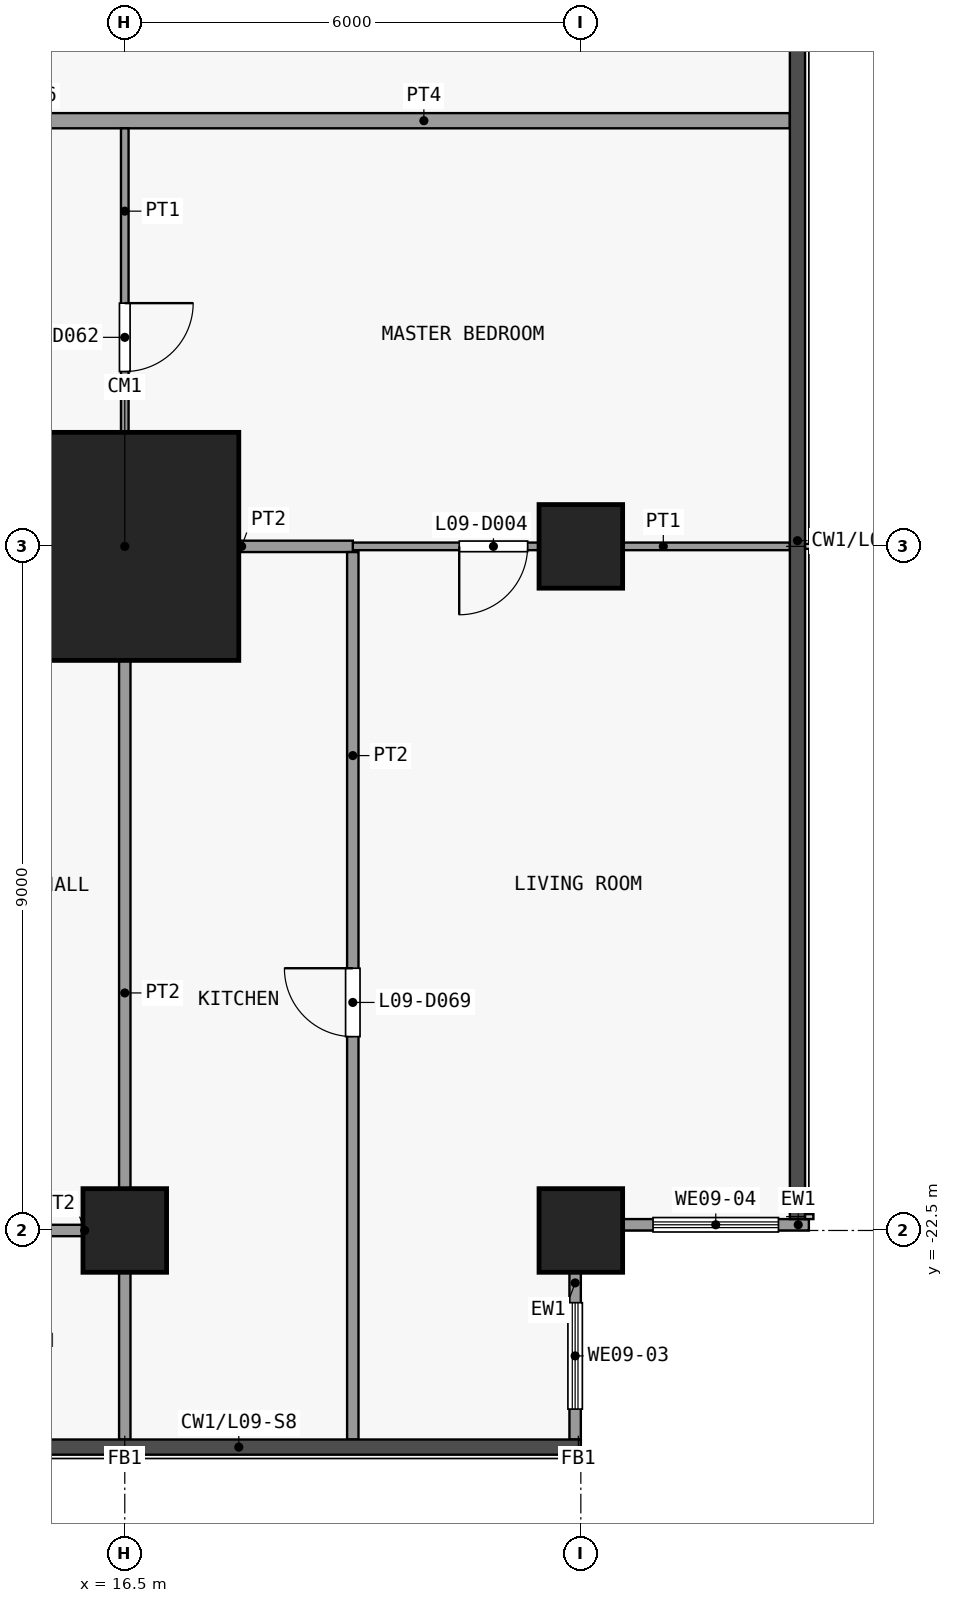
"""IFC4 building model, lengths in metres.
Left out: names, types, materials, properties, quantities, classifications, styles, units other than length and angle.
Written with IfcOpenShell. Run it as: python <this file> out.ifc"""

import sys

from ifc_helpers import new_model, si_unit, direction, frame, frame_2d, origin, origin_2d, place, context, subcontext, project, spatial, rectangle, extrude, element, fill, save


model = new_model("IFC4")
c1 = context("Model", 3, precision=1e-05, world=origin(), true_north=direction((0.0, 1.0)))
c2 = subcontext(c1, "Body", "Model", "MODEL_VIEW")
j1 = project(units=[si_unit("LENGTHUNIT", "METRE"), si_unit("PLANEANGLEUNIT", "RADIAN")], contexts=[c1])
p1 = place(None, origin())
s1 = spatial("IfcSite", under=j1, at=p1, CompositionType="ELEMENT")
p2 = place(p1, origin())
s2 = spatial("IfcBuilding", under=s1, at=p2, CompositionType="ELEMENT")
p3 = place(p2, frame((0.0, 0.0, 43.3)))
s3 = spatial("IfcBuildingStorey", under=s2, at=p3, CompositionType="ELEMENT", Elevation=43.3)
p4 = place(p3, frame((16.5, -22.5, 0.0), z_axis=(0.0, 0.0, 1.0), x_axis=(1.0, 0.0, 0.0)))
e1 = element("IfcColumn", 1, at=p4, inside=s3, PredefinedType="COLUMN", context=c2, shape_type="SweptSolid", body=[
    extrude(rectangle(XDim=1.1, YDim=1.1, at=origin_2d()), origin(), (0.0, 0.0, 1.0), 3.6),
])
p5 = place(p3, frame((16.5, -13.5, 0.0), z_axis=(0.0, 0.0, 1.0), x_axis=(1.0, 0.0, 0.0)))
e2 = element("IfcColumn", 2, at=p5, inside=s3, PredefinedType="COLUMN", context=c2, shape_type="SweptSolid", body=[
    extrude(rectangle(XDim=3.0, YDim=3.0, at=origin_2d()), origin(), (0.0, 0.0, 1.0), 3.6),
])
for number, where, z_axis, x_axis in (
    (3, (22.5, -22.5, 0.0), (0.0, 0.0, 1.0), (1.0, 0.0, 0.0)),
    (4, (22.5, -13.5, 0.0), (0.0, 0.0, 1.0), (1.0, 0.0, 0.0)),
):
    element("IfcColumn", number, at=place(p3, frame(where, z_axis=z_axis, x_axis=x_axis)), inside=s3, PredefinedType="COLUMN", context=c2, shape_type="SweptSolid", body=[
        extrude(rectangle(XDim=1.1, YDim=1.1, at=origin_2d()), origin(), (0.0, 0.0, 1.0), 3.6),
    ])
p6 = place(p3, frame((22.425, -23.05, 0.0), z_axis=(0.0, 0.0, 1.0), x_axis=(0.0, -1.0, 0.0)))
e5 = element("IfcWall", 5, at=p6, inside=s3, PredefinedType="SOLIDWALL", context=c2, shape_type="SweptSolid", body=[
    extrude(rectangle(XDim=2.2, YDim=0.15, at=frame_2d((1.1, 0.0))), origin(), (0.0, 0.0, 1.0), 3.3),
])
p7 = place(p6, frame((0.4, 0.0, 0.9)))
e6 = element("IfcOpeningElement", 6, at=p7, cuts=e5, PredefinedType="OPENING", context=c2, shape_type="SweptSolid", body=[
    extrude(rectangle(XDim=1.4, YDim=2.4, at=frame_2d((0.7, 1.2))), frame((0.0, 0.085, 0.0), z_axis=(0.0, -1.0, 0.0), x_axis=(1.0, 0.0, 0.0)), (0.0, 0.0, 1.0), 0.17),
])
p8 = place(p3, frame((25.5, -22.425, 0.0), z_axis=(0.0, 0.0, 1.0), x_axis=(-1.0, 0.0, 0.0)))
e7 = element("IfcWall", 7, at=p8, inside=s3, PredefinedType="SOLIDWALL", context=c2, shape_type="SweptSolid", body=[
    extrude(rectangle(XDim=2.45, YDim=0.15, at=frame_2d((1.225, 0.0))), origin(), (0.0, 0.0, 1.0), 3.3),
])
p9 = place(p8, frame((0.4, 0.0, 0.9)))
e8 = element("IfcOpeningElement", 8, at=p9, cuts=e7, PredefinedType="OPENING", context=c2, shape_type="SweptSolid", body=[
    extrude(rectangle(XDim=1.65, YDim=2.4, at=frame_2d((0.825, 1.2))), frame((0.0, 0.085, 0.0), z_axis=(0.0, -1.0, 0.0), x_axis=(1.0, 0.0, 0.0)), (0.0, 0.0, 1.0), 0.17),
])
p10 = place(p3, frame((13.5, -22.5, 0.0), z_axis=(0.0, 0.0, 1.0), x_axis=(1.0, 0.0, 0.0)))
e9 = element("IfcWall", 9, at=p10, inside=s3, PredefinedType="PARTITIONING", context=c2, shape_type="SweptSolid", body=[
    extrude(rectangle(XDim=2.925, YDim=0.15, at=frame_2d((1.462, 0.0))), origin(), (0.0, 0.0, 1.0), 3.3),
])
p11 = place(p10, frame((1.0, 0.0, 0.0)))
e10 = element("IfcOpeningElement", 10, at=p11, cuts=e9, PredefinedType="OPENING", context=c2, shape_type="SweptSolid", body=[
    extrude(rectangle(XDim=0.9, YDim=2.1, at=frame_2d((0.45, 1.05))), frame((0.0, 0.085, 0.0), z_axis=(0.0, -1.0, 0.0), x_axis=(1.0, 0.0, 0.0)), (0.0, 0.0, 1.0), 0.17),
])
p12 = place(p3, frame((19.5, -13.5, 0.0), z_axis=(0.0, 0.0, 1.0), x_axis=(1.0, 0.0, 0.0)))
e11 = element("IfcWall", 11, at=p12, inside=s3, PredefinedType="PARTITIONING", context=c2, shape_type="SweptSolid", body=[
    extrude(rectangle(XDim=5.75, YDim=0.1, at=frame_2d((2.875, 0.0))), origin(), (0.0, 0.0, 1.0), 3.3),
])
p13 = place(p12, frame((1.4, 0.0, 0.0)))
e12 = element("IfcOpeningElement", 12, at=p13, cuts=e11, PredefinedType="OPENING", context=c2, shape_type="SweptSolid", body=[
    extrude(rectangle(XDim=0.9, YDim=2.1, at=frame_2d((0.45, 1.05))), frame((0.0, 0.06, 0.0), z_axis=(0.0, -1.0, 0.0), x_axis=(1.0, 0.0, 0.0)), (0.0, 0.0, 1.0), 0.12),
])
p14 = place(p3, frame((16.575, -13.5, 0.0), z_axis=(0.0, 0.0, 1.0), x_axis=(1.0, 0.0, 0.0)))
e13 = element("IfcWall", 13, at=p14, inside=s3, PredefinedType="PARTITIONING", context=c2, shape_type="SweptSolid", body=[
    extrude(rectangle(XDim=2.925, YDim=0.15, at=frame_2d((1.462, 0.0))), origin(), (0.0, 0.0, 1.0), 3.3),
])
p15 = place(p3, frame((13.5, -7.9, 0.0), z_axis=(0.0, 0.0, 1.0), x_axis=(1.0, 0.0, 0.0)))
e14 = element("IfcWall", 14, at=p15, inside=s3, PredefinedType="PARTITIONING", context=c2, shape_type="SweptSolid", body=[
    extrude(rectangle(XDim=11.75, YDim=0.2, at=frame_2d((5.875, 0.0))), origin(), (0.0, 0.0, 1.0), 3.3),
])
p16 = place(p15, frame((1.0, 0.0, 0.0)))
e15 = element("IfcOpeningElement", 15, at=p16, cuts=e14, PredefinedType="OPENING", context=c2, shape_type="SweptSolid", body=[
    extrude(rectangle(XDim=1.0, YDim=2.1, at=frame_2d((0.5, 1.05))), frame((0.0, 0.11, 0.0), z_axis=(0.0, -1.0, 0.0), x_axis=(1.0, 0.0, 0.0)), (0.0, 0.0, 1.0), 0.22),
])
p17 = place(p3, frame((16.5, -13.5, 0.0), z_axis=(0.0, 0.0, 1.0), x_axis=(0.0, 1.0, 0.0)))
e16 = element("IfcWall", 16, at=p17, inside=s3, PredefinedType="PARTITIONING", context=c2, shape_type="SweptSolid", body=[
    extrude(rectangle(XDim=5.5, YDim=0.1, at=frame_2d((2.75, 0.0))), origin(), (0.0, 0.0, 1.0), 3.3),
])
p18 = place(p17, frame((2.3, 0.0, 0.0)))
e17 = element("IfcOpeningElement", 17, at=p18, cuts=e16, PredefinedType="OPENING", context=c2, shape_type="SweptSolid", body=[
    extrude(rectangle(XDim=0.9, YDim=2.1, at=frame_2d((0.45, 1.05))), frame((0.0, 0.06, 0.0), z_axis=(0.0, -1.0, 0.0), x_axis=(1.0, 0.0, 0.0)), (0.0, 0.0, 1.0), 0.12),
])
p19 = place(p3, frame((16.5, -25.25, 0.0), z_axis=(0.0, 0.0, 1.0), x_axis=(0.0, 1.0, 0.0)))
e18 = element("IfcWall", 18, at=p19, inside=s3, PredefinedType="PARTITIONING", context=c2, shape_type="SweptSolid", body=[
    extrude(rectangle(XDim=11.75, YDim=0.15, at=frame_2d((5.875, 0.0))), origin(), (0.0, 0.0, 1.0), 3.3),
])
p20 = place(p3, frame((19.5, -25.25, 0.0), z_axis=(0.0, 0.0, 1.0), x_axis=(0.0, 1.0, 0.0)))
e19 = element("IfcWall", 19, at=p20, inside=s3, PredefinedType="PARTITIONING", context=c2, shape_type="SweptSolid", body=[
    extrude(rectangle(XDim=11.675, YDim=0.15, at=frame_2d((5.837, 0.0))), origin(), (0.0, 0.0, 1.0), 3.3),
])
p21 = place(p20, frame((5.3, 0.0, 0.0)))
e20 = element("IfcOpeningElement", 20, at=p21, cuts=e19, PredefinedType="OPENING", context=c2, shape_type="SweptSolid", body=[
    extrude(rectangle(XDim=0.9, YDim=2.1, at=frame_2d((0.45, 1.05))), frame((0.0, 0.085, 0.0), z_axis=(0.0, -1.0, 0.0), x_axis=(1.0, 0.0, 0.0)), (0.0, 0.0, 1.0), 0.17),
])
p22 = place(p7, origin())
e21 = element("IfcWindow", 21, at=p22, inside=s3, PartitioningType="SINGLE_PANEL", PredefinedType="WINDOW", context=c2, shape_type="SweptSolid", body=[
    extrude(rectangle(XDim=1.4, YDim=2.4, at=frame_2d((0.7, 1.2))), frame((0.0, 0.03, 0.0), z_axis=(0.0, -1.0, 0.0), x_axis=(1.0, 0.0, 0.0)), (0.0, 0.0, 1.0), 0.06),
])
fill(e6, e21)
p23 = place(p9, origin())
e22 = element("IfcWindow", 22, at=p23, inside=s3, PartitioningType="SINGLE_PANEL", PredefinedType="WINDOW", context=c2, shape_type="SweptSolid", body=[
    extrude(rectangle(XDim=1.65, YDim=2.4, at=frame_2d((0.825, 1.2))), frame((0.0, 0.03, 0.0), z_axis=(0.0, -1.0, 0.0), x_axis=(1.0, 0.0, 0.0)), (0.0, 0.0, 1.0), 0.06),
])
fill(e8, e22)
p24 = place(p13, origin())
e23 = element("IfcDoor", 23, at=p24, inside=s3, OperationType="SINGLE_SWING_LEFT", PredefinedType="DOOR", context=c2, shape_type="SweptSolid", body=[
    extrude(rectangle(XDim=0.9, YDim=2.1, at=frame_2d((0.45, 1.05))), frame((0.0, 0.025, 0.0), z_axis=(0.0, -1.0, 0.0), x_axis=(1.0, 0.0, 0.0)), (0.0, 0.0, 1.0), 0.05),
])
fill(e12, e23)
p25 = place(p18, origin())
e24 = element("IfcDoor", 24, at=p25, inside=s3, OperationType="SINGLE_SWING_RIGHT", PredefinedType="DOOR", context=c2, shape_type="SweptSolid", body=[
    extrude(rectangle(XDim=0.9, YDim=2.1, at=frame_2d((0.45, 1.05))), frame((0.0, 0.025, 0.0), z_axis=(0.0, -1.0, 0.0), x_axis=(1.0, 0.0, 0.0)), (0.0, 0.0, 1.0), 0.05),
])
fill(e17, e24)
p26 = place(p21, origin())
e25 = element("IfcDoor", 25, at=p26, inside=s3, OperationType="SINGLE_SWING_LEFT", PredefinedType="DOOR", context=c2, shape_type="SweptSolid", body=[
    extrude(rectangle(XDim=0.9, YDim=2.1, at=frame_2d((0.45, 1.05))), frame((0.0, 0.025, 0.0), z_axis=(0.0, -1.0, 0.0), x_axis=(1.0, 0.0, 0.0)), (0.0, 0.0, 1.0), 0.05),
])
fill(e20, e25)
save(model, sys.argv[1])
